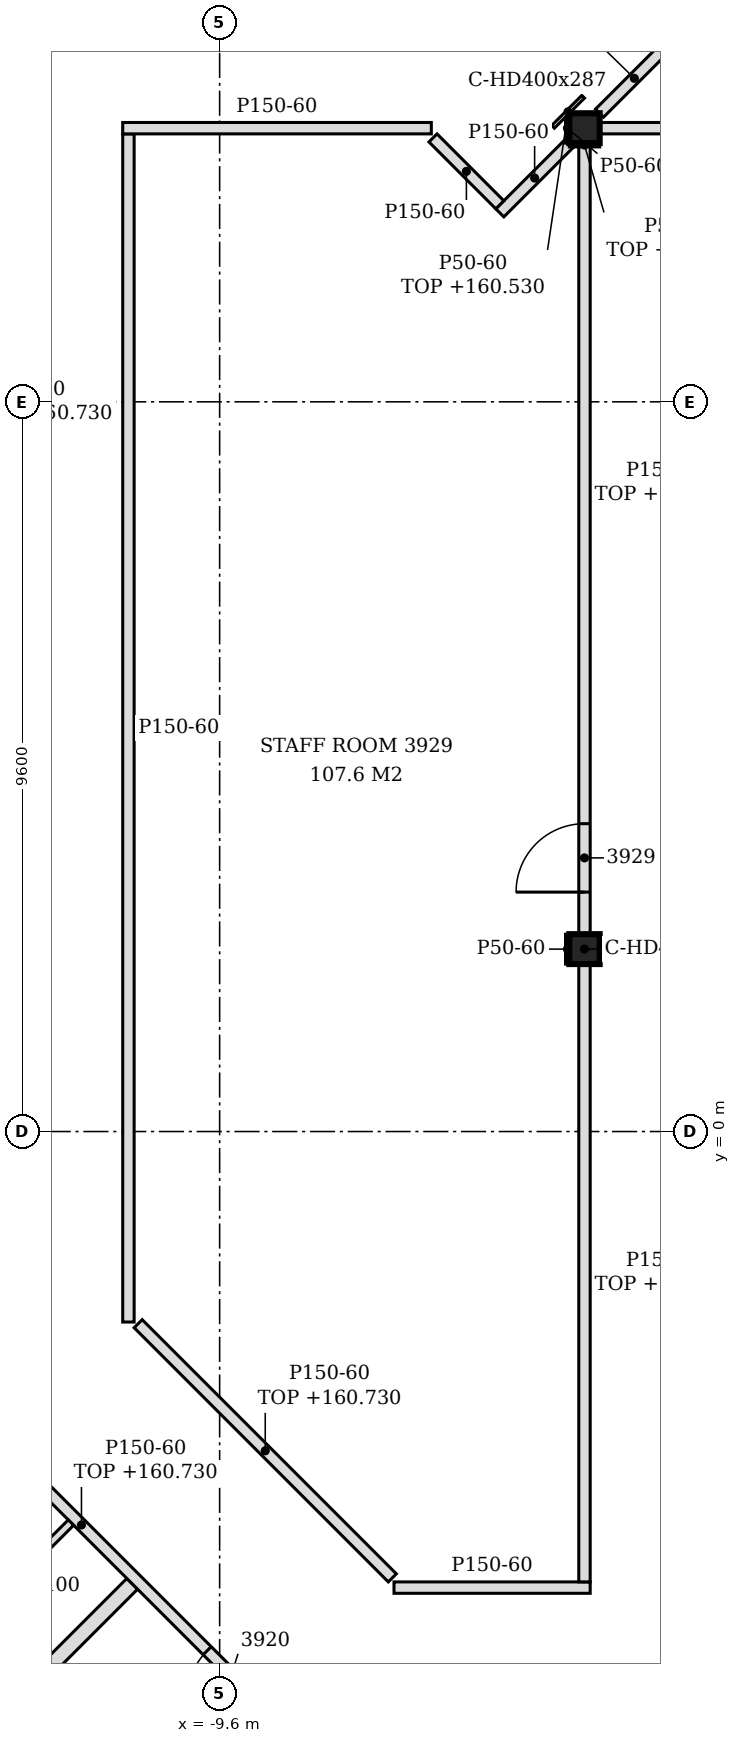
"""IFC4 building model, lengths in metres.
Left out: names, types, materials, properties, quantities, classifications, styles, units other than length and angle.
Written with IfcOpenShell. Run it as: python <this file> out.ifc"""

import sys

from ifc_helpers import new_model, si_unit, direction, frame, frame_2d, origin, origin_2d, place, context, subcontext, project, spatial, polyline, rectangle, i_section, outline, extrude, element, fill, save


model = new_model("IFC4")
c1 = context("Model", 3, precision=1e-05, world=origin(), true_north=direction((0.0, 1.0)))
c2 = subcontext(c1, "Body", "Model", "MODEL_VIEW")
j1 = project(units=[si_unit("LENGTHUNIT", "METRE"), si_unit("PLANEANGLEUNIT", "RADIAN")], contexts=[c1])
p1 = place(None, origin())
s1 = spatial("IfcSite", under=j1, at=p1, CompositionType="ELEMENT")
p2 = place(p1, origin())
s2 = spatial("IfcBuilding", under=s1, at=p2, CompositionType="ELEMENT")
p3 = place(p2, frame((0.0, 0.0, 157.8)))
s3 = spatial("IfcBuildingStorey", under=s2, at=p3, CompositionType="ELEMENT", Elevation=157.8)
for number, where, z_axis, x_axis in (
    (1, (-4.8, 2.4, -0.15), (0.0, 0.0, 1.0), (1.0, 0.0, 0.0)),
    (2, (-4.8, 13.2, -0.15), (0.0, 0.0, 1.0), (1.0, 0.0, 0.0)),
):
    element("IfcColumn", number, at=place(p3, frame(where, z_axis=z_axis, x_axis=x_axis)), inside=s3, PredefinedType="COLUMN", context=c2, shape_type="SweptSolid", body=[
        extrude(i_section(OverallWidth=0.399, OverallDepth=0.393, WebThickness=0.023, FlangeThickness=0.037, FilletRadius=0.015, at=origin_2d()), origin(), (0.0, 0.0, 1.0), 3.6),
    ])
p4 = place(p3, frame((-14.202, -9.402, 0.0), z_axis=(0.0, 0.0, 1.0), x_axis=(0.707081776084, 0.707131785404, 0.0)))
e3 = element("IfcWall", 3, at=p4, inside=s3, PredefinedType="PARTITIONING", context=c2, shape_type="SweptSolid", body=[
    extrude(rectangle(XDim=4.882, YDim=0.2, at=frame_2d((2.441, 0.0))), origin(), (0.0, 0.0, 1.0), 2.93),
])
p5 = place(p3, frame((-8.322, -8.272, 0.0), z_axis=(0.0, 0.0, 1.0), x_axis=(-0.707106781187, 0.707106781187, 0.0)))
e4 = element("IfcWall", 4, at=p5, inside=s3, PredefinedType="PARTITIONING", context=c2, shape_type="SweptSolid", body=[
    extrude(rectangle(XDim=6.718, YDim=0.15, at=frame_2d((3.359, 0.0))), origin(), (0.0, 0.0, 1.0), 2.93),
])
p6 = place(p5, frame((1.139, 0.0, 0.0)))
e5 = element("IfcOpeningElement", 5, at=p6, cuts=e4, PredefinedType="OPENING", context=c2, shape_type="SweptSolid", body=[
    extrude(rectangle(XDim=0.9, YDim=2.1, at=frame_2d((0.45, 1.05))), frame((0.0, 0.085, 0.0), z_axis=(0.0, -1.0, 0.0), x_axis=(1.0, 0.0, 0.0)), (0.0, 0.0, 1.0), 0.17),
])
p7 = place(p3, frame((-13.235, -6.823, 0.0), z_axis=(0.0, 0.0, 1.0), x_axis=(0.707106781187, 0.707106781187, 0.0)))
e6 = element("IfcWall", 6, at=p7, inside=s3, PredefinedType="PARTITIONING", context=c2, shape_type="SweptSolid", body=[
    extrude(rectangle(XDim=2.375, YDim=0.1, at=frame_2d((1.188, 0.0))), origin(), (0.0, 0.0, 1.0), 3.45),
])
p8 = place(p3, frame((-7.306, -6.0, 0.0), z_axis=(0.0, 0.0, 1.0), x_axis=(1.0, 0.0, 0.0)))
e7 = element("IfcWall", 7, at=p8, inside=s3, PredefinedType="PARTITIONING", context=c2, shape_type="SweptSolid", body=[
    extrude(outline(polyline([(0.0, 0.0), (2.581, 0.0), (2.581, 2.83), (2.356, 2.83), (2.354, 3.45), (0.0, 3.45), (0.0, 0.0)])), frame((0.0, 0.075, 0.0), z_axis=(0.0, -1.0, 0.0), x_axis=(1.0, 0.0, 0.0)), (0.0, 0.0, 1.0), 0.15),
])
p9 = place(p3, frame((-7.328, -5.872, 0.0), z_axis=(0.0, 0.0, 1.0), x_axis=(-0.707106781187, 0.707106781187, 0.0)))
e8 = element("IfcWall", 8, at=p9, inside=s3, PredefinedType="PARTITIONING", context=c2, shape_type="SweptSolid", body=[
    extrude(rectangle(XDim=4.729, YDim=0.15, at=frame_2d((2.365, 0.0))), origin(), (0.0, 0.0, 1.0), 2.93),
])
p10 = place(p3, frame((-4.8, -5.925, 0.0), z_axis=(0.0, 0.0, 1.0), x_axis=(0.0, 1.0, 0.0)))
e9 = element("IfcWall", 9, at=p10, inside=s3, PredefinedType="PARTITIONING", context=c2, shape_type="SweptSolid", body=[
    extrude(rectangle(XDim=8.129, YDim=0.15, at=frame_2d((4.064, 0.0))), origin(), (0.0, 0.0, 1.0), 2.83),
])
p11 = place(p3, frame((-10.8, -2.506, 0.0), z_axis=(0.0, 0.0, 1.0), x_axis=(0.0, 1.0, 0.0)))
e10 = element("IfcWall", 10, at=p11, inside=s3, PredefinedType="PARTITIONING", context=c2, shape_type="SweptSolid", body=[
    extrude(outline(polyline([(0.0, 0.0), (15.631, 0.0), (15.631, 3.45), (12.206, 3.45), (12.204, 2.93), (12.006, 2.93), (12.004, 3.45), (7.406, 3.45), (7.404, 2.93), (7.206, 2.93), (7.204, 3.45), (2.606, 3.45), (2.604, 2.93), (2.406, 2.93), (2.404, 3.45), (0.0, 3.45), (0.0, 0.0)])), frame((0.0, 0.075, 0.0), z_axis=(0.0, -1.0, 0.0), x_axis=(1.0, 0.0, 0.0)), (0.0, 0.0, 1.0), 0.15),
])
p12 = place(p3, frame((-4.8, 2.596, 0.0), z_axis=(0.0, 0.0, 1.0), x_axis=(0.0, 1.0, 0.0)))
e11 = element("IfcWall", 11, at=p12, inside=s3, PredefinedType="PARTITIONING", context=c2, shape_type="SweptSolid", body=[
    extrude(rectangle(XDim=10.407, YDim=0.15, at=frame_2d((5.204, 0.0))), origin(), (0.0, 0.0, 1.0), 2.83),
])
p13 = place(p12, frame((0.553, 0.0, 0.0)))
e12 = element("IfcOpeningElement", 12, at=p13, cuts=e11, PredefinedType="OPENING", context=c2, shape_type="SweptSolid", body=[
    extrude(rectangle(XDim=0.9, YDim=2.1, at=frame_2d((0.45, 1.05))), frame((0.0, 0.085, 0.0), z_axis=(0.0, -1.0, 0.0), x_axis=(1.0, 0.0, 0.0)), (0.0, 0.0, 1.0), 0.17),
])
p14 = place(p3, frame((-5.914, 12.086, 0.0), z_axis=(0.0, 0.0, 1.0), x_axis=(0.707106781187, 0.707106781187, 0.0)))
e13 = element("IfcWall", 13, at=p14, inside=s3, PredefinedType="PARTITIONING", context=c2, shape_type="SweptSolid", body=[
    extrude(rectangle(XDim=1.295, YDim=0.15, at=frame_2d((0.648, 0.0))), origin(), (0.0, 0.0, 1.0), 3.45),
])
p15 = place(p3, frame((-5.914, 12.192, 0.0), z_axis=(0.0, 0.0, 1.0), x_axis=(-0.706812296552, 0.70740114323, 0.0)))
e14 = element("IfcWall", 14, at=p15, inside=s3, PredefinedType="PARTITIONING", context=c2, shape_type="SweptSolid", body=[
    extrude(rectangle(XDim=1.244, YDim=0.15, at=frame_2d((0.622, 0.0))), origin(), (0.0, 0.0, 1.0), 3.45),
])
p16 = place(p3, frame((-10.875, 13.2, 0.0), z_axis=(0.0, 0.0, 1.0), x_axis=(1.0, 0.0, 0.0)))
e15 = element("IfcWall", 15, at=p16, inside=s3, PredefinedType="PARTITIONING", context=c2, shape_type="SweptSolid", body=[
    extrude(rectangle(XDim=4.06, YDim=0.15, at=frame_2d((2.03, 0.0))), origin(), (0.0, 0.0, 1.0), 3.45),
])
p17 = place(p3, frame((-4.601, 13.2, 0.0), z_axis=(0.0, 0.0, 1.0), x_axis=(1.0, 0.0, 0.0)))
e16 = element("IfcWall", 16, at=p17, inside=s3, PredefinedType="PARTITIONING", context=c2, shape_type="SweptSolid", body=[
    extrude(rectangle(XDim=4.676, YDim=0.15, at=frame_2d((2.338, 0.0))), origin(), (0.0, 0.0, 1.0), 2.83),
])
p18 = place(p17, frame((1.75, 0.0, 0.0)))
e17 = element("IfcOpeningElement", 17, at=p18, cuts=e16, PredefinedType="OPENING", context=c2, shape_type="SweptSolid", body=[
    extrude(rectangle(XDim=0.9, YDim=2.1, at=frame_2d((0.45, 1.05))), frame((0.0, 0.085, 0.0), z_axis=(0.0, -1.0, 0.0), x_axis=(1.0, 0.0, 0.0)), (0.0, 0.0, 1.0), 0.17),
])
p19 = place(p3, frame((-4.602, 13.398, 0.0), z_axis=(0.0, 0.0, 1.0), x_axis=(0.707106781187, 0.707106781187, 0.0)))
e18 = element("IfcWall", 18, at=p19, inside=s3, PredefinedType="PARTITIONING", context=c2, shape_type="SweptSolid", body=[
    extrude(rectangle(XDim=1.296, YDim=0.15, at=frame_2d((0.648, 0.0))), origin(), (0.0, 0.0, 1.0), 3.45),
])
p20 = place(p3, frame((-13.275, 14.24, 0.0), z_axis=(0.0, 0.0, 1.0), x_axis=(0.707286821097, 0.706926695424, 0.0)))
e19 = element("IfcWall", 19, at=p20, inside=s3, PredefinedType="PARTITIONING", context=c2, shape_type="SweptSolid", body=[
    extrude(rectangle(XDim=2.712, YDim=0.15, at=frame_2d((1.356, 0.0))), origin(), (0.0, 0.0, 1.0), 2.93),
])
p21 = place(p3, frame((-5.024, 2.204, 0.0), z_axis=(0.0, 0.0, 1.0), x_axis=(0.0, 1.0, 0.0)))
e20 = element("IfcWall", 20, at=p21, inside=s3, PredefinedType="PARTITIONING", context=c2, shape_type="SweptSolid", body=[
    extrude(rectangle(XDim=0.393, YDim=0.05, at=frame_2d((0.196, 0.0))), origin(), (0.0, 0.0, 1.0), 3.45),
])
p22 = place(p3, frame((-5.024, 13.003, 0.0), z_axis=(0.0, 0.0, 1.0), x_axis=(0.0, 1.0, 0.0)))
e21 = element("IfcWall", 21, at=p22, inside=s3, PredefinedType="PARTITIONING", context=c2, shape_type="SweptSolid", body=[
    extrude(rectangle(XDim=0.393, YDim=0.05, at=frame_2d((0.197, 0.0))), origin(), (0.0, 0.0, 1.0), 3.45),
])
p23 = place(p3, frame((-5.214, 13.218, 0.0), z_axis=(0.0, 0.0, 1.0), x_axis=(0.707106781187, 0.707106781187, 0.0)))
e22 = element("IfcWall", 22, at=p23, inside=s3, PredefinedType="PARTITIONING", context=c2, shape_type="SweptSolid", body=[
    extrude(rectangle(XDim=0.56, YDim=0.05, at=frame_2d((0.28, 0.0))), origin(), (0.0, 0.0, 1.0), 2.73),
])
p24 = place(p3, frame((-5.0, 12.979, 0.0), z_axis=(0.0, 0.0, 1.0), x_axis=(1.0, 0.0, 0.0)))
e23 = element("IfcWall", 23, at=p24, inside=s3, PredefinedType="PARTITIONING", context=c2, shape_type="SweptSolid", body=[
    extrude(rectangle(XDim=0.399, YDim=0.05, at=frame_2d((0.199, 0.0))), origin(), (0.0, 0.0, 1.0), 2.83),
])
p25 = place(p6, origin())
e24 = element("IfcDoor", 24, at=p25, inside=s3, OperationType="SINGLE_SWING_LEFT", PredefinedType="DOOR", context=c2, shape_type="SweptSolid", body=[
    extrude(rectangle(XDim=0.9, YDim=2.1, at=frame_2d((0.45, 1.05))), frame((0.0, 0.025, 0.0), z_axis=(0.0, -1.0, 0.0), x_axis=(1.0, 0.0, 0.0)), (0.0, 0.0, 1.0), 0.05),
])
fill(e5, e24)
p26 = place(p13, origin())
e25 = element("IfcDoor", 25, at=p26, inside=s3, OperationType="SINGLE_SWING_LEFT", PredefinedType="DOOR", context=c2, shape_type="SweptSolid", body=[
    extrude(rectangle(XDim=0.9, YDim=2.1, at=frame_2d((0.45, 1.05))), frame((0.0, 0.025, 0.0), z_axis=(0.0, -1.0, 0.0), x_axis=(1.0, 0.0, 0.0)), (0.0, 0.0, 1.0), 0.05),
])
fill(e12, e25)
save(model, sys.argv[1])
